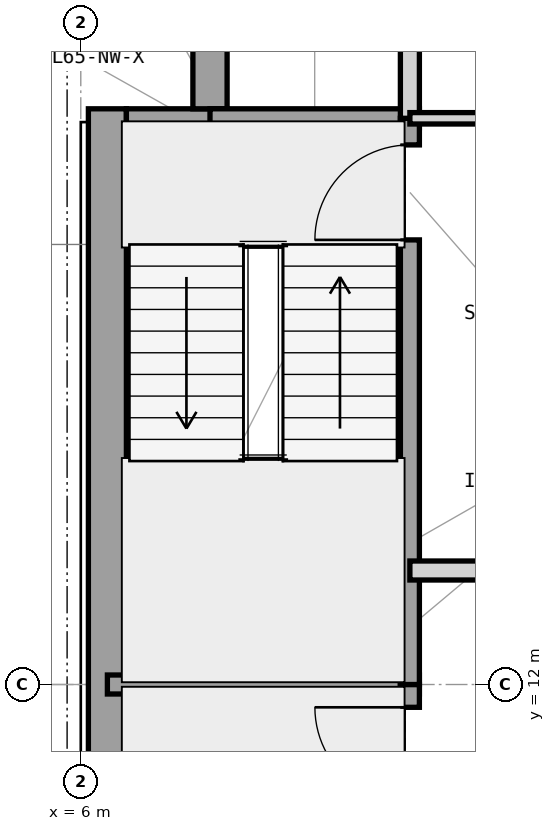
"""IFC4 building model, lengths in metres.
Left out: names, types, materials, properties, quantities, classifications, styles, units other than length and angle.
Written with IfcOpenShell. Run it as: python <this file> out.ifc"""

import sys

from ifc_helpers import new_model, si_unit, direction, frame, frame_2d, origin, place, context, subcontext, project, spatial, rectangle, extrude, element, fill, save


model = new_model("IFC4")
c1 = context("Model", 3, precision=1e-05, world=origin(), true_north=direction((0.0, 1.0)))
c2 = subcontext(c1, "Body", "Model", "MODEL_VIEW")
j1 = project(units=[si_unit("LENGTHUNIT", "METRE"), si_unit("PLANEANGLEUNIT", "RADIAN")], contexts=[c1])
p1 = place(None, origin())
s1 = spatial("IfcSite", under=j1, at=p1, CompositionType="ELEMENT")
p2 = place(p1, origin())
s2 = spatial("IfcBuilding", under=s1, at=p2, CompositionType="ELEMENT")
p3 = place(p2, frame((0.0, 0.0, 266.4)))
s3 = spatial("IfcBuildingStorey", under=s2, at=p3, CompositionType="ELEMENT", Elevation=266.4)
p4 = place(p3, frame((6.35, 4.425, 0.0), z_axis=(0.0, 0.0, 1.0), x_axis=(0.0, 1.0, 0.0)))
e1 = element("IfcWall", 1, at=p4, inside=s3, PredefinedType="SHEAR", context=c2, shape_type="SweptSolid", body=[
    extrude(rectangle(XDim=15.15, YDim=0.5, at=frame_2d((7.575, 0.0))), origin(), (0.0, 0.0, 1.0), 3.9),
])
p5 = place(p3, frame((6.6, 19.35, 0.0), z_axis=(0.0, 0.0, 1.0), x_axis=(1.0, 0.0, 0.0)))
e2 = element("IfcWall", 2, at=p5, inside=s3, PredefinedType="SHEAR", context=c2, shape_type="SweptSolid", body=[
    extrude(rectangle(XDim=1.325, YDim=0.45, at=frame_2d((0.663, 0.0))), origin(), (0.0, 0.0, 1.0), 3.9),
])
p6 = place(p3, frame((7.7, 19.575, 0.0), z_axis=(0.0, 0.0, 1.0), x_axis=(0.0, 1.0, 0.0)))
e3 = element("IfcWall", 3, at=p6, inside=s3, PredefinedType="SHEAR", context=c2, shape_type="SweptSolid", body=[
    extrude(rectangle(XDim=0.825, YDim=0.45, at=frame_2d((0.413, 0.0))), origin(), (0.0, 0.0, 1.0), 3.9),
])
p7 = place(p3, frame((6.35, 12.0, 0.0), z_axis=(0.0, 0.0, 1.0), x_axis=(1.0, 0.0, 0.0)))
e4 = element("IfcWall", 4, at=p7, inside=s3, PredefinedType="SHEAR", context=c2, shape_type="SweptSolid", body=[
    extrude(rectangle(XDim=4.105, YDim=0.25, at=frame_2d((2.052, 0.0))), origin(), (0.0, 0.0, 1.0), 3.9),
])
p8 = place(p3, frame((7.7, 19.45, 0.0), z_axis=(0.0, 0.0, 1.0), x_axis=(1.0, 0.0, 0.0)))
e5 = element("IfcWall", 5, at=p8, inside=s3, PredefinedType="SHEAR", context=c2, shape_type="SweptSolid", body=[
    extrude(rectangle(XDim=2.755, YDim=0.25, at=frame_2d((1.377, 0.0))), origin(), (0.0, 0.0, 1.0), 3.9),
])
p9 = place(p3, frame((10.33, 4.55, 0.0), z_axis=(0.0, 0.0, 1.0), x_axis=(0.0, 1.0, 0.0)))
e6 = element("IfcWall", 6, at=p9, inside=s3, PredefinedType="SHEAR", context=c2, shape_type="SweptSolid", body=[
    extrude(rectangle(XDim=7.45, YDim=0.25, at=frame_2d((3.725, 0.0))), origin(), (0.0, 0.0, 1.0), 3.9),
])
p10 = place(p9, frame((5.9, 0.0, 0.0)))
e7 = element("IfcOpeningElement", 7, at=p10, cuts=e6, PredefinedType="OPENING", context=c2, shape_type="SweptSolid", body=[
    extrude(rectangle(XDim=1.25, YDim=2.2, at=frame_2d((0.625, 1.1))), frame((0.0, 0.135, 0.0), z_axis=(0.0, -1.0, 0.0), x_axis=(1.0, 0.0, 0.0)), (0.0, 0.0, 1.0), 0.27),
])
p11 = place(p3, frame((10.33, 12.0, 0.0), z_axis=(0.0, 0.0, 1.0), x_axis=(0.0, 1.0, 0.0)))
e8 = element("IfcWall", 8, at=p11, inside=s3, PredefinedType="SHEAR", context=c2, shape_type="SweptSolid", body=[
    extrude(rectangle(XDim=7.45, YDim=0.25, at=frame_2d((3.725, 0.0))), origin(), (0.0, 0.0, 1.0), 3.9),
])
p12 = place(p11, frame((5.85, 0.0, 0.0)))
e9 = element("IfcOpeningElement", 9, at=p12, cuts=e8, PredefinedType="OPENING", context=c2, shape_type="SweptSolid", body=[
    extrude(rectangle(XDim=1.25, YDim=2.2, at=frame_2d((0.625, 1.1))), frame((0.0, 0.135, 0.0), z_axis=(0.0, -1.0, 0.0), x_axis=(1.0, 0.0, 0.0)), (0.0, 0.0, 1.0), 0.27),
])
p13 = place(p3, frame((10.33, 19.45, 0.0), z_axis=(0.0, 0.0, 1.0), x_axis=(0.0, 1.0, 0.0)))
e10 = element("IfcWall", 10, at=p13, inside=s3, PredefinedType="PARTITIONING", context=c2, shape_type="SweptSolid", body=[
    extrude(rectangle(XDim=1.2, YDim=0.25, at=frame_2d((0.6, 0.0))), origin(), (0.0, 0.0, 1.0), 3.705),
])
p14 = place(p3, frame((10.33, 13.5, 0.0), z_axis=(0.0, 0.0, 1.0), x_axis=(1.0, 0.0, 0.0)))
e11 = element("IfcWall", 11, at=p14, inside=s3, PredefinedType="PARTITIONING", context=c2, shape_type="SweptSolid", body=[
    extrude(rectangle(XDim=1.62, YDim=0.25, at=frame_2d((0.81, 0.0))), origin(), (0.0, 0.0, 1.0), 3.088),
])
p15 = place(p3, frame((10.33, 19.45, 0.0), z_axis=(0.0, 0.0, 1.0), x_axis=(1.0, 0.0, 0.0)))
e12 = element("IfcWall", 12, at=p15, inside=s3, PredefinedType="PARTITIONING", context=c2, shape_type="SweptSolid", body=[
    extrude(rectangle(XDim=3.82, YDim=0.15, at=frame_2d((1.91, 0.0))), origin(), (0.0, 0.0, 1.0), 3.705),
])
p16 = place(p15, frame((1.25, 0.0, 0.0)))
e13 = element("IfcOpeningElement", 13, at=p16, cuts=e12, PredefinedType="OPENING", context=c2, shape_type="SweptSolid", body=[
    extrude(rectangle(XDim=0.95, YDim=2.1, at=frame_2d((0.475, 1.05))), frame((0.0, 0.085, 0.0), z_axis=(0.0, -1.0, 0.0), x_axis=(1.0, 0.0, 0.0)), (0.0, 0.0, 1.0), 0.17),
])
p17 = place(p10, origin())
e14 = element("IfcDoor", 14, at=p17, inside=s3, OperationType="SINGLE_SWING_RIGHT", PredefinedType="DOOR", context=c2, shape_type="SweptSolid", body=[
    extrude(rectangle(XDim=1.25, YDim=2.2, at=frame_2d((0.625, 1.1))), frame((0.0, 0.025, 0.0), z_axis=(0.0, -1.0, 0.0), x_axis=(1.0, 0.0, 0.0)), (0.0, 0.0, 1.0), 0.05),
])
fill(e7, e14)
p18 = place(p12, origin())
e15 = element("IfcDoor", 15, at=p18, inside=s3, OperationType="SINGLE_SWING_LEFT", PredefinedType="DOOR", context=c2, shape_type="SweptSolid", body=[
    extrude(rectangle(XDim=1.25, YDim=2.2, at=frame_2d((0.625, 1.1))), frame((0.0, 0.025, 0.0), z_axis=(0.0, -1.0, 0.0), x_axis=(1.0, 0.0, 0.0)), (0.0, 0.0, 1.0), 0.05),
])
fill(e9, e15)
save(model, sys.argv[1])
